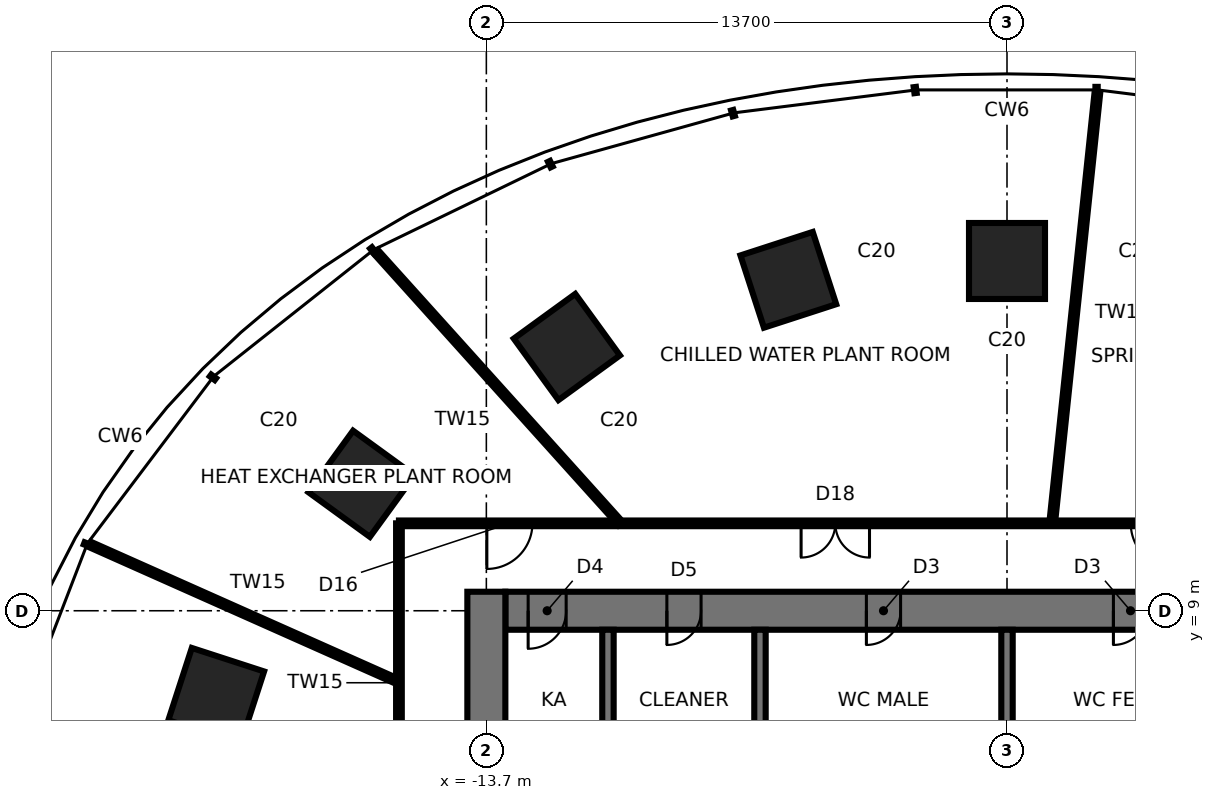
"""IFC4 building model, lengths in metres.
Left out: names, types, materials, properties, quantities, classifications, styles, units other than length and angle.
Written with IfcOpenShell. Run it as: python <this file> out.ifc"""

import sys

from ifc_helpers import new_model, si_unit, direction, frame, frame_2d, origin, origin_2d, place, context, subcontext, project, spatial, rectangle, extrude, element, fill, save


model = new_model("IFC4")
c1 = context("Model", 3, precision=1e-05, world=origin(), true_north=direction((0.0, 1.0)))
c2 = subcontext(c1, "Body", "Model", "MODEL_VIEW")
j1 = project(units=[si_unit("LENGTHUNIT", "METRE"), si_unit("PLANEANGLEUNIT", "RADIAN")], contexts=[c1])
p1 = place(None, origin())
s1 = spatial("IfcSite", under=j1, at=p1, CompositionType="ELEMENT")
p2 = place(p1, origin())
s2 = spatial("IfcBuilding", under=s1, at=p2, CompositionType="ELEMENT")
p3 = place(p2, frame((0.0, 0.0, 86.8)))
s3 = spatial("IfcBuildingStorey", under=s2, at=p3, CompositionType="ELEMENT", Elevation=86.8)
for number, where, z_axis, x_axis in (
    (1, (0.0, 18.204, 0.0), (0.0, 0.0, 1.0), (0.0, 1.0, 0.0)),
    (2, (-5.754, 17.708, 0.0), (0.0, 0.0, 1.0), (-0.309, 0.951, 0.0)),
    (3, (-11.581, 15.94, 0.0), (0.0, 0.0, 1.0), (-0.588, 0.809, 0.0)),
    (4, (-16.986, 12.341, 0.0), (0.0, 0.0, 1.0), (-0.809, 0.588, 0.0)),
    (5, (-20.808, 6.761, 0.0), (0.0, 0.0, 1.0), (-0.951, 0.309, 0.0)),
):
    element("IfcColumn", number, at=place(p3, frame(where, z_axis=z_axis, x_axis=x_axis)), inside=s3, PredefinedType="COLUMN", context=c2, shape_type="SweptSolid", body=[
        extrude(rectangle(XDim=2.0, YDim=2.0, at=origin_2d()), origin(), (0.0, 0.0, 1.0), 5.6),
    ])
p4 = place(p3, frame((13.2, 9.0, 0.0), z_axis=(0.0, 0.0, 1.0), x_axis=(-1.0, 0.0, 0.0)))
e6 = element("IfcWall", 6, at=p4, inside=s3, PredefinedType="SHEAR", context=c2, shape_type="SweptSolid", body=[
    extrude(rectangle(XDim=26.4, YDim=1.0, at=frame_2d((13.2, 0.0))), origin(), (0.0, 0.0, 1.0), 5.6),
])
p5 = place(p4, frame((2.65, 0.0, 0.0)))
e7 = element("IfcOpeningElement", 7, at=p5, cuts=e6, PredefinedType="OPENING", context=c2, shape_type="SweptSolid", body=[
    extrude(rectangle(XDim=0.9, YDim=2.1, at=frame_2d((0.45, 1.05))), frame((0.0, 0.51, 0.0), z_axis=(0.0, -1.0, 0.0), x_axis=(1.0, 0.0, 0.0)), (0.0, 0.0, 1.0), 1.02),
])
p6 = place(p4, frame((9.5, 0.0, 0.0)))
e8 = element("IfcOpeningElement", 8, at=p6, cuts=e6, PredefinedType="OPENING", context=c2, shape_type="SweptSolid", body=[
    extrude(rectangle(XDim=0.9, YDim=2.1, at=frame_2d((0.45, 1.05))), frame((0.0, 0.51, 0.0), z_axis=(0.0, -1.0, 0.0), x_axis=(1.0, 0.0, 0.0)), (0.0, 0.0, 1.0), 1.02),
])
p7 = place(p4, frame((16.0, 0.0, 0.0)))
e9 = element("IfcOpeningElement", 9, at=p7, cuts=e6, PredefinedType="OPENING", context=c2, shape_type="SweptSolid", body=[
    extrude(rectangle(XDim=0.9, YDim=2.1, at=frame_2d((0.45, 1.05))), frame((0.0, 0.51, 0.0), z_axis=(0.0, -1.0, 0.0), x_axis=(1.0, 0.0, 0.0)), (0.0, 0.0, 1.0), 1.02),
])
p8 = place(p4, frame((21.25, 0.0, 0.0)))
e10 = element("IfcOpeningElement", 10, at=p8, cuts=e6, PredefinedType="OPENING", context=c2, shape_type="SweptSolid", body=[
    extrude(rectangle(XDim=0.9, YDim=2.1, at=frame_2d((0.45, 1.05))), frame((0.0, 0.51, 0.0), z_axis=(0.0, -1.0, 0.0), x_axis=(1.0, 0.0, 0.0)), (0.0, 0.0, 1.0), 1.02),
])
p9 = place(p4, frame((24.8, 0.0, 0.0)))
e11 = element("IfcOpeningElement", 11, at=p9, cuts=e6, PredefinedType="OPENING", context=c2, shape_type="SweptSolid", body=[
    extrude(rectangle(XDim=1.0, YDim=2.1, at=frame_2d((0.5, 1.05))), frame((0.0, 0.51, 0.0), z_axis=(0.0, -1.0, 0.0), x_axis=(1.0, 0.0, 0.0)), (0.0, 0.0, 1.0), 1.02),
])
p10 = place(p3, frame((-13.7, 9.5, 0.0), z_axis=(0.0, 0.0, 1.0), x_axis=(0.0, -1.0, 0.0)))
e12 = element("IfcWall", 12, at=p10, inside=s3, PredefinedType="SHEAR", context=c2, shape_type="SweptSolid", body=[
    extrude(rectangle(XDim=19.0, YDim=1.0, at=frame_2d((9.5, 0.0))), origin(), (0.0, 0.0, 1.0), 5.6),
])
p11 = place(p10, frame((8.6, 0.0, 0.0)))
e13 = element("IfcOpeningElement", 13, at=p11, cuts=e12, PredefinedType="OPENING", context=c2, shape_type="SweptSolid", body=[
    extrude(rectangle(XDim=1.8, YDim=2.4, at=frame_2d((0.9, 1.2))), frame((0.0, 0.51, 0.0), z_axis=(0.0, -1.0, 0.0), x_axis=(1.0, 0.0, 0.0)), (0.0, 0.0, 1.0), 1.02),
])
for number, where, z_axis, x_axis in (
    (14, (-6.5, 4.75, 0.0), (0.0, 0.0, 1.0), (0.0, 1.0, 0.0)),
    (15, (0.0, 4.75, 0.0), (0.0, 0.0, 1.0), (0.0, 1.0, 0.0)),
    (16, (-10.5, 4.75, 0.0), (0.0, 0.0, 1.0), (0.0, 1.0, 0.0)),
):
    element("IfcWall", number, at=place(p3, frame(where, z_axis=z_axis, x_axis=x_axis)), inside=s3, PredefinedType="SHEAR", context=c2, shape_type="SweptSolid", body=[
        extrude(rectangle(XDim=3.75, YDim=0.3, at=frame_2d((1.875, 0.0))), origin(), (0.0, 0.0, 1.0), 5.6),
    ])
p12 = place(p3, frame((1.188, 11.3, 0.0), z_axis=(0.0, 0.0, 1.0), x_axis=(0.10452632632, 0.994522119968, 0.0)))
e17 = element("IfcWall", 17, at=p12, inside=s3, PredefinedType="PARTITIONING", context=c2, shape_type="SweptSolid", body=[
    extrude(rectangle(XDim=11.389, YDim=0.15, at=frame_2d((5.694, 0.0))), origin(), (0.0, 0.0, 1.0), 5.4),
])
p13 = place(p3, frame((16.0, 11.3, 0.0), z_axis=(0.0, 0.0, 1.0), x_axis=(-1.0, 0.0, 0.0)))
e18 = element("IfcWall", 18, at=p13, inside=s3, PredefinedType="PARTITIONING", context=c2, shape_type="SweptSolid", body=[
    extrude(rectangle(XDim=32.0, YDim=0.15, at=frame_2d((16.0, 0.0))), origin(), (0.0, 0.0, 1.0), 5.4),
])
p14 = place(p13, frame((7.026, 0.0, 0.0)))
e19 = element("IfcOpeningElement", 19, at=p14, cuts=e18, PredefinedType="OPENING", context=c2, shape_type="SweptSolid", body=[
    extrude(rectangle(XDim=1.2, YDim=2.1, at=frame_2d((0.6, 1.05))), frame((0.0, 0.085, 0.0), z_axis=(0.0, -1.0, 0.0), x_axis=(1.0, 0.0, 0.0)), (0.0, 0.0, 1.0), 0.17),
])
p15 = place(p13, frame((11.544, 0.0, 0.0)))
e20 = element("IfcOpeningElement", 20, at=p15, cuts=e18, PredefinedType="OPENING", context=c2, shape_type="SweptSolid", body=[
    extrude(rectangle(XDim=1.2, YDim=2.1, at=frame_2d((0.6, 1.05))), frame((0.0, 0.085, 0.0), z_axis=(0.0, -1.0, 0.0), x_axis=(1.0, 0.0, 0.0)), (0.0, 0.0, 1.0), 0.17),
])
p16 = place(p13, frame((19.618, 0.0, 0.0)))
e21 = element("IfcOpeningElement", 21, at=p16, cuts=e18, PredefinedType="OPENING", context=c2, shape_type="SweptSolid", body=[
    extrude(rectangle(XDim=1.8, YDim=2.4, at=frame_2d((0.9, 1.2))), frame((0.0, 0.085, 0.0), z_axis=(0.0, -1.0, 0.0), x_axis=(1.0, 0.0, 0.0)), (0.0, 0.0, 1.0), 0.17),
])
p17 = place(p13, frame((28.487, 0.0, 0.0)))
e22 = element("IfcOpeningElement", 22, at=p17, cuts=e18, PredefinedType="OPENING", context=c2, shape_type="SweptSolid", body=[
    extrude(rectangle(XDim=1.2, YDim=2.1, at=frame_2d((0.6, 1.05))), frame((0.0, 0.085, 0.0), z_axis=(0.0, -1.0, 0.0), x_axis=(1.0, 0.0, 0.0)), (0.0, 0.0, 1.0), 0.17),
])
p18 = place(p3, frame((-10.175, 11.3, 0.0), z_axis=(0.0, 0.0, 1.0), x_axis=(-0.669134495154, 0.743141323972, 0.0)))
e23 = element("IfcWall", 23, at=p18, inside=s3, PredefinedType="PARTITIONING", context=c2, shape_type="SweptSolid", body=[
    extrude(rectangle(XDim=9.613, YDim=0.15, at=frame_2d((4.807, 0.0))), origin(), (0.0, 0.0, 1.0), 5.4),
])
p19 = place(p3, frame((-16.0, 7.124, 0.0), z_axis=(0.0, 0.0, 1.0), x_axis=(-0.913550959064, 0.406724286457, 0.0)))
e24 = element("IfcWall", 24, at=p19, inside=s3, PredefinedType="PARTITIONING", context=c2, shape_type="SweptSolid", body=[
    extrude(rectangle(XDim=8.892, YDim=0.15, at=frame_2d((4.446, 0.0))), origin(), (0.0, 0.0, 1.0), 5.4),
])
p20 = place(p3, frame((-16.0, 11.3, 0.0), z_axis=(0.0, 0.0, 1.0), x_axis=(0.0, -1.0, 0.0)))
e25 = element("IfcWall", 25, at=p20, inside=s3, PredefinedType="PARTITIONING", context=c2, shape_type="SweptSolid", body=[
    extrude(rectangle(XDim=22.6, YDim=0.15, at=frame_2d((11.3, 0.0))), origin(), (0.0, 0.0, 1.0), 5.4),
])
p21 = place(p20, frame((8.539, 0.0, 0.0)))
e26 = element("IfcOpeningElement", 26, at=p21, cuts=e25, PredefinedType="OPENING", context=c2, shape_type="SweptSolid", body=[
    extrude(rectangle(XDim=1.8, YDim=2.4, at=frame_2d((0.9, 1.2))), frame((0.0, 0.085, 0.0), z_axis=(0.0, -1.0, 0.0), x_axis=(1.0, 0.0, 0.0)), (0.0, 0.0, 1.0), 0.17),
])
p22 = place(p20, frame((17.725, 0.0, 0.0)))
e27 = element("IfcOpeningElement", 27, at=p22, cuts=e25, PredefinedType="OPENING", context=c2, shape_type="SweptSolid", body=[
    extrude(rectangle(XDim=1.8, YDim=2.4, at=frame_2d((0.9, 1.2))), frame((0.0, 0.085, 0.0), z_axis=(0.0, -1.0, 0.0), x_axis=(1.0, 0.0, 0.0)), (0.0, 0.0, 1.0), 0.17),
])
p23 = place(p6, origin())
e28 = element("IfcDoor", 28, at=p23, inside=s3, OperationType="SINGLE_SWING_RIGHT", PredefinedType="DOOR", context=c2, shape_type="SweptSolid", body=[
    extrude(rectangle(XDim=0.82, YDim=2.06, at=frame_2d((0.45, 1.03))), frame((0.0, 0.025, 0.0), z_axis=(0.0, -1.0, 0.0), x_axis=(1.0, 0.0, 0.0)), (0.0, 0.0, 1.0), 0.05),
    extrude(rectangle(XDim=0.04, YDim=2.1, at=frame_2d((0.02, 1.05))), frame((0.0, 0.25, 0.0), z_axis=(0.0, -1.0, 0.0), x_axis=(1.0, 0.0, 0.0)), (0.0, 0.0, 1.0), 0.5),
    extrude(rectangle(XDim=0.04, YDim=2.1, at=frame_2d((0.88, 1.05))), frame((0.0, 0.25, 0.0), z_axis=(0.0, -1.0, 0.0), x_axis=(1.0, 0.0, 0.0)), (0.0, 0.0, 1.0), 0.5),
    extrude(rectangle(XDim=0.82, YDim=0.04, at=frame_2d((0.45, 2.08))), frame((0.0, 0.25, 0.0), z_axis=(0.0, -1.0, 0.0), x_axis=(1.0, 0.0, 0.0)), (0.0, 0.0, 1.0), 0.5),
])
fill(e8, e28)
p24 = place(p7, origin())
e29 = element("IfcDoor", 29, at=p24, inside=s3, OperationType="SINGLE_SWING_RIGHT", PredefinedType="DOOR", context=c2, shape_type="SweptSolid", body=[
    extrude(rectangle(XDim=0.82, YDim=2.06, at=frame_2d((0.45, 1.03))), frame((0.0, 0.025, 0.0), z_axis=(0.0, -1.0, 0.0), x_axis=(1.0, 0.0, 0.0)), (0.0, 0.0, 1.0), 0.05),
    extrude(rectangle(XDim=0.04, YDim=2.1, at=frame_2d((0.02, 1.05))), frame((0.0, 0.25, 0.0), z_axis=(0.0, -1.0, 0.0), x_axis=(1.0, 0.0, 0.0)), (0.0, 0.0, 1.0), 0.5),
    extrude(rectangle(XDim=0.04, YDim=2.1, at=frame_2d((0.88, 1.05))), frame((0.0, 0.25, 0.0), z_axis=(0.0, -1.0, 0.0), x_axis=(1.0, 0.0, 0.0)), (0.0, 0.0, 1.0), 0.5),
    extrude(rectangle(XDim=0.82, YDim=0.04, at=frame_2d((0.45, 2.08))), frame((0.0, 0.25, 0.0), z_axis=(0.0, -1.0, 0.0), x_axis=(1.0, 0.0, 0.0)), (0.0, 0.0, 1.0), 0.5),
])
fill(e9, e29)
p25 = place(p8, origin())
e30 = element("IfcDoor", 30, at=p25, inside=s3, OperationType="SINGLE_SWING_RIGHT", PredefinedType="DOOR", context=c2, shape_type="SweptSolid", body=[
    extrude(rectangle(XDim=0.82, YDim=2.06, at=frame_2d((0.45, 1.03))), frame((0.0, 0.025, 0.0), z_axis=(0.0, -1.0, 0.0), x_axis=(1.0, 0.0, 0.0)), (0.0, 0.0, 1.0), 0.05),
    extrude(rectangle(XDim=0.04, YDim=2.1, at=frame_2d((0.02, 1.05))), frame((0.0, 0.25, 0.0), z_axis=(0.0, -1.0, 0.0), x_axis=(1.0, 0.0, 0.0)), (0.0, 0.0, 1.0), 0.5),
    extrude(rectangle(XDim=0.04, YDim=2.1, at=frame_2d((0.88, 1.05))), frame((0.0, 0.25, 0.0), z_axis=(0.0, -1.0, 0.0), x_axis=(1.0, 0.0, 0.0)), (0.0, 0.0, 1.0), 0.5),
    extrude(rectangle(XDim=0.82, YDim=0.04, at=frame_2d((0.45, 2.08))), frame((0.0, 0.25, 0.0), z_axis=(0.0, -1.0, 0.0), x_axis=(1.0, 0.0, 0.0)), (0.0, 0.0, 1.0), 0.5),
])
fill(e10, e30)
p26 = place(p9, origin())
e31 = element("IfcDoor", 31, at=p26, inside=s3, OperationType="SINGLE_SWING_RIGHT", PredefinedType="DOOR", context=c2, shape_type="SweptSolid", body=[
    extrude(rectangle(XDim=0.92, YDim=2.06, at=frame_2d((0.5, 1.03))), frame((0.0, 0.025, 0.0), z_axis=(0.0, -1.0, 0.0), x_axis=(1.0, 0.0, 0.0)), (0.0, 0.0, 1.0), 0.05),
    extrude(rectangle(XDim=0.04, YDim=2.1, at=frame_2d((0.02, 1.05))), frame((0.0, 0.25, 0.0), z_axis=(0.0, -1.0, 0.0), x_axis=(1.0, 0.0, 0.0)), (0.0, 0.0, 1.0), 0.5),
    extrude(rectangle(XDim=0.04, YDim=2.1, at=frame_2d((0.98, 1.05))), frame((0.0, 0.25, 0.0), z_axis=(0.0, -1.0, 0.0), x_axis=(1.0, 0.0, 0.0)), (0.0, 0.0, 1.0), 0.5),
    extrude(rectangle(XDim=0.92, YDim=0.04, at=frame_2d((0.5, 2.08))), frame((0.0, 0.25, 0.0), z_axis=(0.0, -1.0, 0.0), x_axis=(1.0, 0.0, 0.0)), (0.0, 0.0, 1.0), 0.5),
])
fill(e11, e31)
p27 = place(p15, origin())
e32 = element("IfcDoor", 32, at=p27, inside=s3, OperationType="SINGLE_SWING_LEFT", PredefinedType="DOOR", context=c2, shape_type="SweptSolid", body=[
    extrude(rectangle(XDim=1.2, YDim=2.1, at=frame_2d((0.6, 1.05))), frame((0.0, 0.025, 0.0), z_axis=(0.0, -1.0, 0.0), x_axis=(1.0, 0.0, 0.0)), (0.0, 0.0, 1.0), 0.05),
])
fill(e20, e32)
p28 = place(p16, origin())
e33 = element("IfcDoor", 33, at=p28, inside=s3, OperationType="DOUBLE_DOOR_SINGLE_SWING", PredefinedType="DOOR", context=c2, shape_type="SweptSolid", body=[
    extrude(rectangle(XDim=1.8, YDim=2.4, at=frame_2d((0.9, 1.2))), frame((0.0, 0.025, 0.0), z_axis=(0.0, -1.0, 0.0), x_axis=(1.0, 0.0, 0.0)), (0.0, 0.0, 1.0), 0.05),
])
fill(e21, e33)
p29 = place(p17, origin())
e34 = element("IfcDoor", 34, at=p29, inside=s3, OperationType="SINGLE_SWING_RIGHT", PredefinedType="DOOR", context=c2, shape_type="SweptSolid", body=[
    extrude(rectangle(XDim=1.2, YDim=2.1, at=frame_2d((0.6, 1.05))), frame((0.0, 0.025, 0.0), z_axis=(0.0, -1.0, 0.0), x_axis=(1.0, 0.0, 0.0)), (0.0, 0.0, 1.0), 0.05),
])
fill(e22, e34)
save(model, sys.argv[1])
